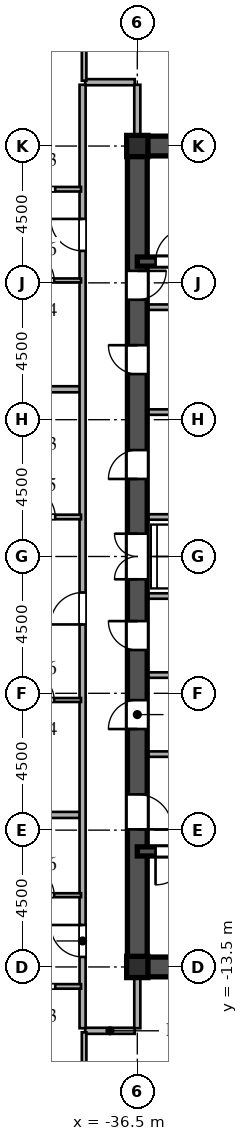
"""IFC4 building model, lengths in metres.
Left out: names, types, materials, properties, quantities, classifications, styles, units other than length and angle.
Written with IfcOpenShell. Run it as: python <this file> out.ifc"""

import sys

from ifc_helpers import new_model, si_unit, direction, frame, frame_2d, origin, origin_2d, place, context, subcontext, project, spatial, rectangle, i_section, extrude, source, transform, mapped, element, fill, save


model = new_model("IFC4")
c1 = context("Model", 3, precision=1e-05, world=origin(), true_north=direction((0.0, 1.0)))
c2 = subcontext(c1, "Body", "Model", "MODEL_VIEW")
j1 = project(units=[si_unit("LENGTHUNIT", "METRE"), si_unit("PLANEANGLEUNIT", "RADIAN")], contexts=[c1])
p1 = place(None, origin())
s1 = spatial("IfcSite", under=j1, at=p1, CompositionType="ELEMENT")
p2 = place(p1, origin())
s2 = spatial("IfcBuilding", under=s1, at=p2, CompositionType="ELEMENT")
p3 = place(p2, frame((0.0, 0.0, 114.0)))
s3 = spatial("IfcBuildingStorey", under=s2, at=p3, CompositionType="ELEMENT", Elevation=114.0)
m1 = source(origin(), c2, "Body", "SweptSolid", [
    extrude(i_section(OverallWidth=0.7, OverallDepth=0.7, WebThickness=0.028, FlangeThickness=0.045, at=origin_2d()), origin(), (0.0, 0.0, 1.0), 3.6),
])
for number, where, z_axis, x_axis in (
    (1, (-36.5, -13.5, 0.0), (0.0, 0.0, 1.0), (1.0, 0.0, 0.0)),
    (2, (-36.5, 13.5, 0.0), (0.0, 0.0, 1.0), (1.0, 0.0, 0.0)),
):
    element("IfcColumn", number, at=place(p3, frame(where, z_axis=z_axis, x_axis=x_axis)), inside=s3, PredefinedType="COLUMN", context=c2, shape_type="MappedRepresentation", body=[
        mapped(m1, transform((0.0, 0.0, 0.0), scale=1.0)),
    ])
for number, where, z_axis, x_axis in (
    (3, (-36.5, -13.5, 0.0), (0.0, 0.0, 1.0), (1.0, 0.0, 0.0)),
    (4, (-36.5, 13.5, 0.0), (0.0, 0.0, 1.0), (1.0, 0.0, 0.0)),
):
    element("IfcWall", number, at=place(p3, frame(where, z_axis=z_axis, x_axis=x_axis)), inside=s3, PredefinedType="SHEAR", context=c2, shape_type="SweptSolid", body=[
        extrude(rectangle(XDim=9.0, YDim=0.65, at=frame_2d((4.5, 0.0))), origin(), (0.0, 0.0, 1.0), 3.38),
    ])
p4 = place(p3, frame((-36.5, -13.65, 0.0), z_axis=(0.0, 0.0, 1.0), x_axis=(0.0, 1.0, 0.0)))
e5 = element("IfcWall", 5, at=p4, inside=s3, PredefinedType="SHEAR", context=c2, shape_type="SweptSolid", body=[
    extrude(rectangle(XDim=7.15, YDim=0.65, at=frame_2d((3.575, 0.0))), origin(), (0.0, 0.0, 1.0), 3.38),
])
p5 = place(p4, frame((4.675, 0.0, 0.0)))
e6 = element("IfcOpeningElement", 6, at=p5, cuts=e5, PredefinedType="OPENING", context=c2, shape_type="SweptSolid", body=[
    extrude(rectangle(XDim=1.15, YDim=2.2, at=frame_2d((0.575, 1.1))), frame((0.0, 0.335, 0.0), z_axis=(0.0, -1.0, 0.0), x_axis=(1.0, 0.0, 0.0)), (0.0, 0.0, 1.0), 0.67),
])
p6 = place(p3, frame((-36.5, -1.3, 0.0), z_axis=(0.0, 0.0, 1.0), x_axis=(0.0, 1.0, 0.0)))
e7 = element("IfcWall", 7, at=p6, inside=s3, PredefinedType="SHEAR", context=c2, shape_type="SweptSolid", body=[
    extrude(rectangle(XDim=2.6, YDim=0.65, at=frame_2d((1.3, 0.0))), origin(), (0.0, 0.0, 1.0), 3.38),
])
p7 = place(p6, frame((0.55, 0.0, 0.0)))
e8 = element("IfcOpeningElement", 8, at=p7, cuts=e7, PredefinedType="OPENING", context=c2, shape_type="SweptSolid", body=[
    extrude(rectangle(XDim=1.5, YDim=2.3, at=frame_2d((0.75, 1.15))), frame((0.0, 0.335, 0.0), z_axis=(0.0, -1.0, 0.0), x_axis=(1.0, 0.0, 0.0)), (0.0, 0.0, 1.0), 0.67),
])
p8 = place(p3, frame((-36.5, 8.2, 0.0), z_axis=(0.0, 0.0, 1.0), x_axis=(0.0, 1.0, 0.0)))
e9 = element("IfcWall", 9, at=p8, inside=s3, PredefinedType="SHEAR", context=c2, shape_type="SweptSolid", body=[
    extrude(rectangle(XDim=5.45, YDim=0.65, at=frame_2d((2.725, 0.0))), origin(), (0.0, 0.0, 1.0), 3.38),
])
p9 = place(p8, frame((0.245, 0.0, 0.0)))
e10 = element("IfcOpeningElement", 10, at=p9, cuts=e9, PredefinedType="OPENING", context=c2, shape_type="SweptSolid", body=[
    extrude(rectangle(XDim=0.95, YDim=2.15, at=frame_2d((0.475, 1.075))), frame((0.0, 0.335, 0.0), z_axis=(0.0, -1.0, 0.0), x_axis=(1.0, 0.0, 0.0)), (0.0, 0.0, 1.0), 0.67),
])
p10 = place(p3, frame((-36.5, -6.5, 0.0), z_axis=(0.0, 0.0, 1.0), x_axis=(0.0, 1.0, 0.0)))
e11 = element("IfcWall", 11, at=p10, inside=s3, PredefinedType="SHEAR", context=c2, shape_type="SweptSolid", body=[
    extrude(rectangle(XDim=2.6, YDim=0.65, at=frame_2d((1.3, 0.0))), origin(), (0.0, 0.0, 1.0), 3.38),
])
p11 = place(p10, frame((0.825, 0.0, 0.0)))
e12 = element("IfcOpeningElement", 12, at=p11, cuts=e11, PredefinedType="OPENING", context=c2, shape_type="SweptSolid", body=[
    extrude(rectangle(XDim=0.95, YDim=2.15, at=frame_2d((0.475, 1.075))), frame((0.0, 0.335, 0.0), z_axis=(0.0, -1.0, 0.0), x_axis=(1.0, 0.0, 0.0)), (0.0, 0.0, 1.0), 0.67),
])
p12 = place(p3, frame((-36.5, -3.9, 0.0), z_axis=(0.0, 0.0, 1.0), x_axis=(0.0, 1.0, 0.0)))
e13 = element("IfcWall", 13, at=p12, inside=s3, PredefinedType="SHEAR", context=c2, shape_type="SweptSolid", body=[
    extrude(rectangle(XDim=2.6, YDim=0.65, at=frame_2d((1.3, 0.0))), origin(), (0.0, 0.0, 1.0), 3.38),
])
p13 = place(p12, frame((0.825, 0.0, 0.0)))
e14 = element("IfcOpeningElement", 14, at=p13, cuts=e13, PredefinedType="OPENING", context=c2, shape_type="SweptSolid", body=[
    extrude(rectangle(XDim=0.95, YDim=2.15, at=frame_2d((0.475, 1.075))), frame((0.0, 0.335, 0.0), z_axis=(0.0, -1.0, 0.0), x_axis=(1.0, 0.0, 0.0)), (0.0, 0.0, 1.0), 0.67),
])
p14 = place(p3, frame((-36.5, 1.3, 0.0), z_axis=(0.0, 0.0, 1.0), x_axis=(0.0, 1.0, 0.0)))
e15 = element("IfcWall", 15, at=p14, inside=s3, PredefinedType="SHEAR", context=c2, shape_type="SweptSolid", body=[
    extrude(rectangle(XDim=3.45, YDim=0.65, at=frame_2d((1.725, 0.0))), origin(), (0.0, 0.0, 1.0), 3.38),
])
p15 = place(p14, frame((1.25, 0.0, 0.0)))
e16 = element("IfcOpeningElement", 16, at=p15, cuts=e15, PredefinedType="OPENING", context=c2, shape_type="SweptSolid", body=[
    extrude(rectangle(XDim=0.95, YDim=2.15, at=frame_2d((0.475, 1.075))), frame((0.0, 0.335, 0.0), z_axis=(0.0, -1.0, 0.0), x_axis=(1.0, 0.0, 0.0)), (0.0, 0.0, 1.0), 0.67),
])
p16 = place(p3, frame((-36.5, 4.75, 0.0), z_axis=(0.0, 0.0, 1.0), x_axis=(0.0, 1.0, 0.0)))
e17 = element("IfcWall", 17, at=p16, inside=s3, PredefinedType="SHEAR", context=c2, shape_type="SweptSolid", body=[
    extrude(rectangle(XDim=3.45, YDim=0.65, at=frame_2d((1.725, 0.0))), origin(), (0.0, 0.0, 1.0), 3.38),
])
p17 = place(p16, frame((1.25, 0.0, 0.0)))
e18 = element("IfcOpeningElement", 18, at=p17, cuts=e17, PredefinedType="OPENING", context=c2, shape_type="SweptSolid", body=[
    extrude(rectangle(XDim=0.95, YDim=2.15, at=frame_2d((0.475, 1.075))), frame((0.0, 0.335, 0.0), z_axis=(0.0, -1.0, 0.0), x_axis=(1.0, 0.0, 0.0)), (0.0, 0.0, 1.0), 0.67),
])
p18 = place(p3, frame((-36.5, -9.7, 0.0), z_axis=(0.0, 0.0, 1.0), x_axis=(1.0, 0.0, 0.0)))
e19 = element("IfcWall", 19, at=p18, inside=s3, PredefinedType="SHEAR", context=c2, shape_type="SweptSolid", body=[
    extrude(rectangle(XDim=9.0, YDim=0.3, at=frame_2d((4.5, 0.0))), origin(), (0.0, 0.0, 1.0), 3.38),
])
p19 = place(p18, frame((0.6, 0.0, 0.0)))
e20 = element("IfcOpeningElement", 20, at=p19, cuts=e19, PredefinedType="OPENING", context=c2, shape_type="SweptSolid", body=[
    extrude(rectangle(XDim=1.1, YDim=2.2, at=frame_2d((0.55, 1.1))), frame((0.0, 0.16, 0.0), z_axis=(0.0, -1.0, 0.0), x_axis=(1.0, 0.0, 0.0)), (0.0, 0.0, 1.0), 0.32),
])
p20 = place(p3, frame((-36.5, 9.7, 0.0), z_axis=(0.0, 0.0, 1.0), x_axis=(1.0, 0.0, 0.0)))
e21 = element("IfcWall", 21, at=p20, inside=s3, PredefinedType="SHEAR", context=c2, shape_type="SweptSolid", body=[
    extrude(rectangle(XDim=9.0, YDim=0.3, at=frame_2d((4.5, 0.0))), origin(), (0.0, 0.0, 1.0), 3.38),
])
p21 = place(p20, frame((0.6, 0.0, 0.0)))
e22 = element("IfcOpeningElement", 22, at=p21, cuts=e21, PredefinedType="OPENING", context=c2, shape_type="SweptSolid", body=[
    extrude(rectangle(XDim=1.1, YDim=2.2, at=frame_2d((0.55, 1.1))), frame((0.0, 0.16, 0.0), z_axis=(0.0, -1.0, 0.0), x_axis=(1.0, 0.0, 0.0)), (0.0, 0.0, 1.0), 0.32),
])
for number, where, z_axis, x_axis in (
    (23, (-36.15, -6.5, 0.0), (0.0, 0.0, 1.0), (1.0, 0.0, 0.0)),
    (24, (-36.15, 8.2, 0.0), (0.0, 0.0, 1.0), (1.0, 0.0, 0.0)),
):
    element("IfcWall", number, at=place(p3, frame(where, z_axis=z_axis, x_axis=x_axis)), inside=s3, PredefinedType="PARTITIONING", context=c2, shape_type="SweptSolid", body=[
        extrude(rectangle(XDim=5.7, YDim=0.18, at=frame_2d((2.85, 0.0))), origin(), (0.0, 0.0, 1.0), 3.38),
    ])
for number, where, z_axis, x_axis in (
    (25, (-36.15, -1.3, 0.0), (0.0, 0.0, 1.0), (1.0, 0.0, 0.0)),
    (26, (-36.15, 1.3, 0.0), (0.0, 0.0, 1.0), (1.0, 0.0, 0.0)),
    (27, (-36.15, -3.9, 0.0), (0.0, 0.0, 1.0), (1.0, 0.0, 0.0)),
    (28, (-36.15, 4.75, 0.0), (0.0, 0.0, 1.0), (1.0, 0.0, 0.0)),
):
    element("IfcWall", number, at=place(p3, frame(where, z_axis=z_axis, x_axis=x_axis)), inside=s3, PredefinedType="PARTITIONING", context=c2, shape_type="SweptSolid", body=[
        extrude(rectangle(XDim=2.95, YDim=0.18, at=frame_2d((1.475, 0.0))), origin(), (0.0, 0.0, 1.0), 3.38),
    ])
p22 = place(p3, frame((-38.215, -15.6, 0.0), z_axis=(0.0, 0.0, 1.0), x_axis=(1.0, 0.0, 0.0)))
e29 = element("IfcWall", 29, at=p22, inside=s3, PredefinedType="PARTITIONING", context=c2, shape_type="SweptSolid", body=[
    extrude(rectangle(XDim=1.63, YDim=0.2, at=frame_2d((0.815, 0.0))), origin(), (0.0, 0.0, 1.0), 3.38),
])
p23 = place(p3, frame((-41.0, -14.14, 0.0), z_axis=(0.0, 0.0, 1.0), x_axis=(1.0, 0.0, 0.0)))
e30 = element("IfcWall", 30, at=p23, inside=s3, PredefinedType="PARTITIONING", context=c2, shape_type="SweptSolid", body=[
    extrude(rectangle(XDim=2.65, YDim=0.15, at=frame_2d((1.325, 0.0))), origin(), (0.0, 0.0, 1.0), 3.38),
])
p24 = place(p23, frame((0.85, 0.0, 0.0)))
e31 = element("IfcOpeningElement", 31, at=p24, cuts=e30, PredefinedType="OPENING", context=c2, shape_type="SweptSolid", body=[
    extrude(rectangle(XDim=0.95, YDim=2.15, at=frame_2d((0.475, 1.075))), frame((0.0, 0.085, 0.0), z_axis=(0.0, -1.0, 0.0), x_axis=(1.0, 0.0, 0.0)), (0.0, 0.0, 1.0), 0.17),
])
p25 = place(p3, frame((-41.0, -11.14, 0.0), z_axis=(0.0, 0.0, 1.0), x_axis=(1.0, 0.0, 0.0)))
e32 = element("IfcWall", 32, at=p25, inside=s3, PredefinedType="PARTITIONING", context=c2, shape_type="SweptSolid", body=[
    extrude(rectangle(XDim=2.65, YDim=0.13, at=frame_2d((1.325, 0.0))), origin(), (0.0, 0.0, 1.0), 3.38),
])
p26 = place(p25, frame((0.885, 0.0, 0.0)))
e33 = element("IfcOpeningElement", 33, at=p26, cuts=e32, PredefinedType="OPENING", context=c2, shape_type="SweptSolid", body=[
    extrude(rectangle(XDim=0.88, YDim=2.1, at=frame_2d((0.44, 1.05))), frame((0.0, 0.075, 0.0), z_axis=(0.0, -1.0, 0.0), x_axis=(1.0, 0.0, 0.0)), (0.0, 0.0, 1.0), 0.15),
])
p27 = place(p3, frame((-62.69, -8.5, 0.0), z_axis=(0.0, 0.0, 1.0), x_axis=(1.0, 0.0, 0.0)))
e34 = element("IfcWall", 34, at=p27, inside=s3, PredefinedType="PARTITIONING", context=c2, shape_type="SweptSolid", body=[
    extrude(rectangle(XDim=24.31, YDim=0.2, at=frame_2d((12.155, 0.0))), origin(), (0.0, 0.0, 1.0), 3.38),
])
p28 = place(p3, frame((-41.0, -4.72, 0.0), z_axis=(0.0, 0.0, 1.0), x_axis=(1.0, 0.0, 0.0)))
e35 = element("IfcWall", 35, at=p28, inside=s3, PredefinedType="PARTITIONING", context=c2, shape_type="SweptSolid", body=[
    extrude(rectangle(XDim=2.65, YDim=0.13, at=frame_2d((1.325, 0.0))), origin(), (0.0, 0.0, 1.0), 3.38),
])
p29 = place(p28, frame((0.885, 0.0, 0.0)))
e36 = element("IfcOpeningElement", 36, at=p29, cuts=e35, PredefinedType="OPENING", context=c2, shape_type="SweptSolid", body=[
    extrude(rectangle(XDim=0.88, YDim=2.1, at=frame_2d((0.44, 1.05))), frame((0.0, 0.075, 0.0), z_axis=(0.0, -1.0, 0.0), x_axis=(1.0, 0.0, 0.0)), (0.0, 0.0, 1.0), 0.15),
])
p30 = place(p3, frame((-41.0, 1.3, 0.0), z_axis=(0.0, 0.0, 1.0), x_axis=(1.0, 0.0, 0.0)))
e37 = element("IfcWall", 37, at=p30, inside=s3, PredefinedType="PARTITIONING", context=c2, shape_type="SweptSolid", body=[
    extrude(rectangle(XDim=2.65, YDim=0.15, at=frame_2d((1.325, 0.0))), origin(), (0.0, 0.0, 1.0), 3.38),
])
p31 = place(p30, frame((0.85, 0.0, 0.0)))
e38 = element("IfcOpeningElement", 38, at=p31, cuts=e37, PredefinedType="OPENING", context=c2, shape_type="SweptSolid", body=[
    extrude(rectangle(XDim=0.95, YDim=2.15, at=frame_2d((0.475, 1.075))), frame((0.0, 0.085, 0.0), z_axis=(0.0, -1.0, 0.0), x_axis=(1.0, 0.0, 0.0)), (0.0, 0.0, 1.0), 0.17),
])
p32 = place(p3, frame((-68.458, 5.5, 0.0), z_axis=(0.0, 0.0, 1.0), x_axis=(1.0, 0.0, 0.0)))
e39 = element("IfcWall", 39, at=p32, inside=s3, PredefinedType="PARTITIONING", context=c2, shape_type="SweptSolid", body=[
    extrude(rectangle(XDim=30.079, YDim=0.2, at=frame_2d((15.039, 0.0))), origin(), (0.0, 0.0, 1.0), 3.38),
])
p33 = place(p3, frame((-41.0, 9.08, 0.0), z_axis=(0.0, 0.0, 1.0), x_axis=(1.0, 0.0, 0.0)))
e40 = element("IfcWall", 40, at=p33, inside=s3, PredefinedType="PARTITIONING", context=c2, shape_type="SweptSolid", body=[
    extrude(rectangle(XDim=2.65, YDim=0.13, at=frame_2d((1.325, 0.0))), origin(), (0.0, 0.0, 1.0), 3.38),
])
p34 = place(p33, frame((0.885, 0.0, 0.0)))
e41 = element("IfcOpeningElement", 41, at=p34, cuts=e40, PredefinedType="OPENING", context=c2, shape_type="SweptSolid", body=[
    extrude(rectangle(XDim=0.88, YDim=2.1, at=frame_2d((0.44, 1.05))), frame((0.0, 0.075, 0.0), z_axis=(0.0, -1.0, 0.0), x_axis=(1.0, 0.0, 0.0)), (0.0, 0.0, 1.0), 0.15),
])
p35 = place(p3, frame((-41.0, 12.08, 0.0), z_axis=(0.0, 0.0, 1.0), x_axis=(1.0, 0.0, 0.0)))
e42 = element("IfcWall", 42, at=p35, inside=s3, PredefinedType="PARTITIONING", context=c2, shape_type="SweptSolid", body=[
    extrude(rectangle(XDim=2.65, YDim=0.15, at=frame_2d((1.325, 0.0))), origin(), (0.0, 0.0, 1.0), 3.38),
])
p36 = place(p35, frame((0.85, 0.0, 0.0)))
e43 = element("IfcOpeningElement", 43, at=p36, cuts=e42, PredefinedType="OPENING", context=c2, shape_type="SweptSolid", body=[
    extrude(rectangle(XDim=0.95, YDim=2.15, at=frame_2d((0.475, 1.075))), frame((0.0, 0.085, 0.0), z_axis=(0.0, -1.0, 0.0), x_axis=(1.0, 0.0, 0.0)), (0.0, 0.0, 1.0), 0.17),
])
p37 = place(p3, frame((-38.215, 15.6, 0.0), z_axis=(0.0, 0.0, 1.0), x_axis=(1.0, 0.0, 0.0)))
e44 = element("IfcWall", 44, at=p37, inside=s3, PredefinedType="PARTITIONING", context=c2, shape_type="SweptSolid", body=[
    extrude(rectangle(XDim=1.63, YDim=0.2, at=frame_2d((0.815, 0.0))), origin(), (0.0, 0.0, 1.0), 3.38),
])
p38 = place(p3, frame((-38.3, -15.515, 0.0), z_axis=(0.0, 0.0, 1.0), x_axis=(0.0, 1.0, 0.0)))
e45 = element("IfcWall", 45, at=p38, inside=s3, PredefinedType="PARTITIONING", context=c2, shape_type="SweptSolid", body=[
    extrude(rectangle(XDim=31.03, YDim=0.2, at=frame_2d((15.515, 0.0))), origin(), (0.0, 0.0, 1.0), 3.38),
])
p39 = place(p38, frame((2.345, 0.0, 0.0)))
e46 = element("IfcOpeningElement", 46, at=p39, cuts=e45, PredefinedType="OPENING", context=c2, shape_type="SweptSolid", body=[
    extrude(rectangle(XDim=1.05, YDim=2.25, at=frame_2d((0.525, 1.125))), frame((0.0, 0.11, 0.0), z_axis=(0.0, -1.0, 0.0), x_axis=(1.0, 0.0, 0.0)), (0.0, 0.0, 1.0), 0.22),
])
p40 = place(p38, frame((13.28, 0.0, 0.0)))
e47 = element("IfcOpeningElement", 47, at=p40, cuts=e45, PredefinedType="OPENING", context=c2, shape_type="SweptSolid", body=[
    extrude(rectangle(XDim=1.05, YDim=2.25, at=frame_2d((0.525, 1.125))), frame((0.0, 0.11, 0.0), z_axis=(0.0, -1.0, 0.0), x_axis=(1.0, 0.0, 0.0)), (0.0, 0.0, 1.0), 0.22),
])
p41 = place(p38, frame((25.567, 0.0, 0.0)))
e48 = element("IfcOpeningElement", 48, at=p41, cuts=e45, PredefinedType="OPENING", context=c2, shape_type="SweptSolid", body=[
    extrude(rectangle(XDim=1.05, YDim=2.25, at=frame_2d((0.525, 1.125))), frame((0.0, 0.11, 0.0), z_axis=(0.0, -1.0, 0.0), x_axis=(1.0, 0.0, 0.0)), (0.0, 0.0, 1.0), 0.22),
])
p42 = place(p3, frame((-38.25, -21.071, 0.0), z_axis=(0.0, 0.0, 1.0), x_axis=(0.0, 1.0, 0.0)))
e49 = element("IfcWall", 49, at=p42, inside=s3, PredefinedType="PARTITIONING", context=c2, shape_type="SweptSolid", body=[
    extrude(rectangle(XDim=5.421, YDim=0.15, at=frame_2d((2.71, 0.0))), origin(), (0.0, 0.0, 1.0), 3.38),
])
p43 = place(p42, frame((0.578, 0.0, 0.0)))
e50 = element("IfcOpeningElement", 50, at=p43, cuts=e49, PredefinedType="OPENING", context=c2, shape_type="SweptSolid", body=[
    extrude(rectangle(XDim=0.95, YDim=2.15, at=frame_2d((0.475, 1.075))), frame((0.0, 0.085, 0.0), z_axis=(0.0, -1.0, 0.0), x_axis=(1.0, 0.0, 0.0)), (0.0, 0.0, 1.0), 0.17),
])
p44 = place(p3, frame((-38.25, 15.65, 0.0), z_axis=(0.0, 0.0, 1.0), x_axis=(0.0, 1.0, 0.0)))
e51 = element("IfcWall", 51, at=p44, inside=s3, PredefinedType="PARTITIONING", context=c2, shape_type="SweptSolid", body=[
    extrude(rectangle(XDim=5.421, YDim=0.15, at=frame_2d((2.71, 0.0))), origin(), (0.0, 0.0, 1.0), 3.38),
])
p45 = place(p44, frame((1.175, 0.0, 0.0)))
e52 = element("IfcOpeningElement", 52, at=p45, cuts=e51, PredefinedType="OPENING", context=c2, shape_type="SweptSolid", body=[
    extrude(rectangle(XDim=0.95, YDim=2.15, at=frame_2d((0.475, 1.075))), frame((0.0, 0.085, 0.0), z_axis=(0.0, -1.0, 0.0), x_axis=(1.0, 0.0, 0.0)), (0.0, 0.0, 1.0), 0.17),
])
for number, where, z_axis, x_axis in (
    (53, (-36.5, -15.515, 0.0), (0.0, 0.0, 1.0), (0.0, 1.0, 0.0)),
    (54, (-36.5, 13.83, 0.0), (0.0, 0.0, 1.0), (0.0, 1.0, 0.0)),
):
    element("IfcWall", number, at=place(p3, frame(where, z_axis=z_axis, x_axis=x_axis)), inside=s3, PredefinedType="PARTITIONING", context=c2, shape_type="SweptSolid", body=[
        extrude(rectangle(XDim=1.685, YDim=0.2, at=frame_2d((0.842, 0.0))), origin(), (0.0, 0.0, 1.0), 2.78),
    ])
m2 = source(origin(), c2, "Body", "SweptSolid", [
    extrude(rectangle(XDim=1.15, YDim=2.2, at=frame_2d((0.575, 1.1))), frame((0.0, 0.025, 0.0), z_axis=(0.0, -1.0, 0.0), x_axis=(1.0, 0.0, 0.0)), (0.0, 0.0, 1.0), 0.05),
])
p46 = place(p5, frame((1.15, 0.0, 0.0), z_axis=(0.0, 0.0, 1.0), x_axis=(-1.0, 0.0, 0.0)))
e55 = element("IfcDoor", 55, at=p46, inside=s3, OperationType="SINGLE_SWING_LEFT", PredefinedType="DOOR", context=c2, shape_type="MappedRepresentation", body=[
    mapped(m2, transform((0.0, 0.0, 0.0), scale=1.0)),
])
fill(e6, e55)
m3 = source(origin(), c2, "Body", "SweptSolid", [
    extrude(rectangle(XDim=1.5, YDim=2.3, at=frame_2d((0.75, 1.15))), frame((0.0, 0.025, 0.0), z_axis=(0.0, -1.0, 0.0), x_axis=(1.0, 0.0, 0.0)), (0.0, 0.0, 1.0), 0.05),
])
p47 = place(p7, origin())
e56 = element("IfcDoor", 56, at=p47, inside=s3, OperationType="DOUBLE_SWING_LEFT", PredefinedType="DOOR", context=c2, shape_type="MappedRepresentation", body=[
    mapped(m3, transform((0.0, 0.0, 0.0), scale=1.0)),
])
fill(e8, e56)
m4 = source(origin(), c2, "Body", "SweptSolid", [
    extrude(rectangle(XDim=0.95, YDim=2.15, at=frame_2d((0.475, 1.075))), frame((0.0, 0.025, 0.0), z_axis=(0.0, -1.0, 0.0), x_axis=(1.0, 0.0, 0.0)), (0.0, 0.0, 1.0), 0.05),
])
p48 = place(p9, frame((0.95, 0.0, 0.0), z_axis=(0.0, 0.0, 1.0), x_axis=(-1.0, 0.0, 0.0)))
e57 = element("IfcDoor", 57, at=p48, inside=s3, OperationType="SINGLE_SWING_RIGHT", PredefinedType="DOOR", context=c2, shape_type="MappedRepresentation", body=[
    mapped(m4, transform((0.0, 0.0, 0.0), scale=1.0)),
])
fill(e10, e57)
p49 = place(p11, origin())
e58 = element("IfcDoor", 58, at=p49, inside=s3, OperationType="SINGLE_SWING_LEFT", PredefinedType="DOOR", context=c2, shape_type="MappedRepresentation", body=[
    mapped(m4, transform((0.0, 0.0, 0.0), scale=1.0)),
])
fill(e12, e58)
p50 = place(p13, origin())
e59 = element("IfcDoor", 59, at=p50, inside=s3, OperationType="SINGLE_SWING_RIGHT", PredefinedType="DOOR", context=c2, shape_type="MappedRepresentation", body=[
    mapped(m4, transform((0.0, 0.0, 0.0), scale=1.0)),
])
fill(e14, e59)
p51 = place(p15, origin())
e60 = element("IfcDoor", 60, at=p51, inside=s3, OperationType="SINGLE_SWING_LEFT", PredefinedType="DOOR", context=c2, shape_type="MappedRepresentation", body=[
    mapped(m4, transform((0.0, 0.0, 0.0), scale=1.0)),
])
fill(e16, e60)
p52 = place(p17, origin())
e61 = element("IfcDoor", 61, at=p52, inside=s3, OperationType="SINGLE_SWING_RIGHT", PredefinedType="DOOR", context=c2, shape_type="MappedRepresentation", body=[
    mapped(m4, transform((0.0, 0.0, 0.0), scale=1.0)),
])
fill(e18, e61)
m5 = source(origin(), c2, "Body", "SweptSolid", [
    extrude(rectangle(XDim=1.1, YDim=2.2, at=frame_2d((0.55, 1.1))), frame((0.0, 0.025, 0.0), z_axis=(0.0, -1.0, 0.0), x_axis=(1.0, 0.0, 0.0)), (0.0, 0.0, 1.0), 0.05),
])
p53 = place(p19, frame((1.1, 0.0, 0.0), z_axis=(0.0, 0.0, 1.0), x_axis=(-1.0, 0.0, 0.0)))
e62 = element("IfcDoor", 62, at=p53, inside=s3, OperationType="SINGLE_SWING_LEFT", PredefinedType="DOOR", context=c2, shape_type="MappedRepresentation", body=[
    mapped(m5, transform((0.0, 0.0, 0.0), scale=1.0)),
])
fill(e20, e62)
p54 = place(p21, origin())
e63 = element("IfcDoor", 63, at=p54, inside=s3, OperationType="SINGLE_SWING_RIGHT", PredefinedType="DOOR", context=c2, shape_type="MappedRepresentation", body=[
    mapped(m5, transform((0.0, 0.0, 0.0), scale=1.0)),
])
fill(e22, e63)
m6 = source(origin(), c2, "Body", "SweptSolid", [
    extrude(rectangle(XDim=0.88, YDim=2.1, at=frame_2d((0.44, 1.05))), frame((0.0, 0.025, 0.0), z_axis=(0.0, -1.0, 0.0), x_axis=(1.0, 0.0, 0.0)), (0.0, 0.0, 1.0), 0.05),
])
p55 = place(p26, origin())
e64 = element("IfcDoor", 64, at=p55, inside=s3, OperationType="SINGLE_SWING_LEFT", PredefinedType="DOOR", context=c2, shape_type="MappedRepresentation", body=[
    mapped(m6, transform((0.0, 0.0, 0.0), scale=1.0)),
])
fill(e33, e64)
p56 = place(p29, origin())
e65 = element("IfcDoor", 65, at=p56, inside=s3, OperationType="SINGLE_SWING_LEFT", PredefinedType="DOOR", context=c2, shape_type="MappedRepresentation", body=[
    mapped(m6, transform((0.0, 0.0, 0.0), scale=1.0)),
])
fill(e36, e65)
m7 = source(origin(), c2, "Body", "SweptSolid", [
    extrude(rectangle(XDim=0.95, YDim=2.15, at=frame_2d((0.475, 1.075))), frame((0.0, 0.025, 0.0), z_axis=(0.0, -1.0, 0.0), x_axis=(1.0, 0.0, 0.0)), (0.0, 0.0, 1.0), 0.05),
])
p57 = place(p31, origin())
e66 = element("IfcDoor", 66, at=p57, inside=s3, OperationType="SINGLE_SWING_LEFT", PredefinedType="DOOR", context=c2, shape_type="MappedRepresentation", body=[
    mapped(m7, transform((0.0, 0.0, 0.0), scale=1.0)),
])
fill(e38, e66)
p58 = place(p34, origin())
e67 = element("IfcDoor", 67, at=p58, inside=s3, OperationType="SINGLE_SWING_LEFT", PredefinedType="DOOR", context=c2, shape_type="MappedRepresentation", body=[
    mapped(m6, transform((0.0, 0.0, 0.0), scale=1.0)),
])
fill(e41, e67)
m8 = source(origin(), c2, "Body", "SweptSolid", [
    extrude(rectangle(XDim=1.05, YDim=2.25, at=frame_2d((0.525, 1.125))), frame((0.0, 0.025, 0.0), z_axis=(0.0, -1.0, 0.0), x_axis=(1.0, 0.0, 0.0)), (0.0, 0.0, 1.0), 0.05),
])
p59 = place(p39, origin())
e68 = element("IfcDoor", 68, at=p59, inside=s3, OperationType="SINGLE_SWING_RIGHT", PredefinedType="DOOR", context=c2, shape_type="MappedRepresentation", body=[
    mapped(m8, transform((0.0, 0.0, 0.0), scale=1.0)),
])
fill(e46, e68)
p60 = place(p40, origin())
e69 = element("IfcDoor", 69, at=p60, inside=s3, OperationType="SINGLE_SWING_LEFT", PredefinedType="DOOR", context=c2, shape_type="MappedRepresentation", body=[
    mapped(m8, transform((0.0, 0.0, 0.0), scale=1.0)),
])
fill(e47, e69)
p61 = place(p41, origin())
e70 = element("IfcDoor", 70, at=p61, inside=s3, OperationType="SINGLE_SWING_RIGHT", PredefinedType="DOOR", context=c2, shape_type="MappedRepresentation", body=[
    mapped(m8, transform((0.0, 0.0, 0.0), scale=1.0)),
])
fill(e48, e70)
save(model, sys.argv[1])
